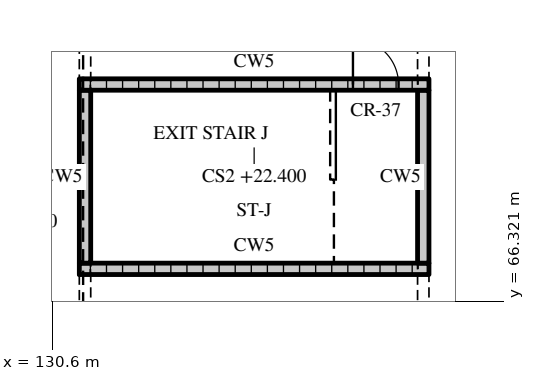
"""IFC4 building model, lengths in metres.
Left out: names, types, materials, properties, quantities, classifications, styles, units other than length and angle.
Written with IfcOpenShell. Run it as: python <this file> out.ifc"""

import sys

from ifc_helpers import new_model, si_unit, direction, frame, frame_2d, origin, place, context, subcontext, project, spatial, rectangle, extrude, element, fill, save


model = new_model("IFC4")
c1 = context("Model", 3, precision=1e-05, world=origin(), true_north=direction((0.0, 1.0)))
c2 = subcontext(c1, "Body", "Model", "MODEL_VIEW")
j1 = project(units=[si_unit("LENGTHUNIT", "METRE"), si_unit("PLANEANGLEUNIT", "RADIAN")], contexts=[c1])
p1 = place(None, origin())
s1 = spatial("IfcSite", under=j1, at=p1, CompositionType="ELEMENT")
p2 = place(p1, origin())
s2 = spatial("IfcBuilding", under=s1, at=p2, CompositionType="ELEMENT")
p3 = place(p2, frame((0.0, 0.0, 19.2)))
s3 = spatial("IfcBuildingStorey", under=s2, at=p3, CompositionType="ELEMENT", Elevation=19.2)
p4 = place(p3, frame((131.3, 67.175, 0.0), z_axis=(0.0, 0.0, 1.0), x_axis=(1.0, 0.0, 0.0)))
e1 = element("IfcWall", 1, at=p4, inside=s3, PredefinedType="SOLIDWALL", context=c2, shape_type="SweptSolid", body=[
    extrude(rectangle(XDim=9.2, YDim=0.3, at=frame_2d((4.6, 0.0))), origin(), (0.0, 0.0, 1.0), 3.0),
])
for number, where, z_axis, x_axis in (
    (2, (131.45, 67.325, 0.0), (0.0, 0.0, 1.0), (0.0, 1.0, 0.0)),
    (3, (140.35, 67.325, 0.0), (0.0, 0.0, 1.0), (0.0, 1.0, 0.0)),
):
    element("IfcWall", number, at=place(p3, frame(where, z_axis=z_axis, x_axis=x_axis)), inside=s3, PredefinedType="SOLIDWALL", context=c2, shape_type="SweptSolid", body=[
        extrude(rectangle(XDim=4.55, YDim=0.3, at=frame_2d((2.275, 0.0))), origin(), (0.0, 0.0, 1.0), 3.0),
    ])
p5 = place(p3, frame((131.3, 72.025, 0.0), z_axis=(0.0, 0.0, 1.0), x_axis=(1.0, 0.0, 0.0)))
e4 = element("IfcWall", 4, at=p5, inside=s3, PredefinedType="SOLIDWALL", context=c2, shape_type="SweptSolid", body=[
    extrude(rectangle(XDim=9.2, YDim=0.3, at=frame_2d((4.6, 0.0))), origin(), (0.0, 0.0, 1.0), 3.0),
])
p6 = place(p5, frame((7.2, 0.0, 0.0)))
e5 = element("IfcOpeningElement", 5, at=p6, cuts=e4, PredefinedType="OPENING", context=c2, shape_type="SweptSolid", body=[
    extrude(rectangle(XDim=1.2, YDim=2.1, at=frame_2d((0.6, 1.05))), frame((0.0, 0.16, 0.0), z_axis=(0.0, -1.0, 0.0), x_axis=(1.0, 0.0, 0.0)), (0.0, 0.0, 1.0), 0.32),
])
p7 = place(p6, origin())
e6 = element("IfcDoor", 6, at=p7, inside=s3, OperationType="SINGLE_SWING_LEFT", PredefinedType="DOOR", context=c2, shape_type="SweptSolid", body=[
    extrude(rectangle(XDim=1.2, YDim=2.1, at=frame_2d((0.6, 1.05))), frame((0.0, 0.025, 0.0), z_axis=(0.0, -1.0, 0.0), x_axis=(1.0, 0.0, 0.0)), (0.0, 0.0, 1.0), 0.05),
])
fill(e5, e6)
save(model, sys.argv[1])
